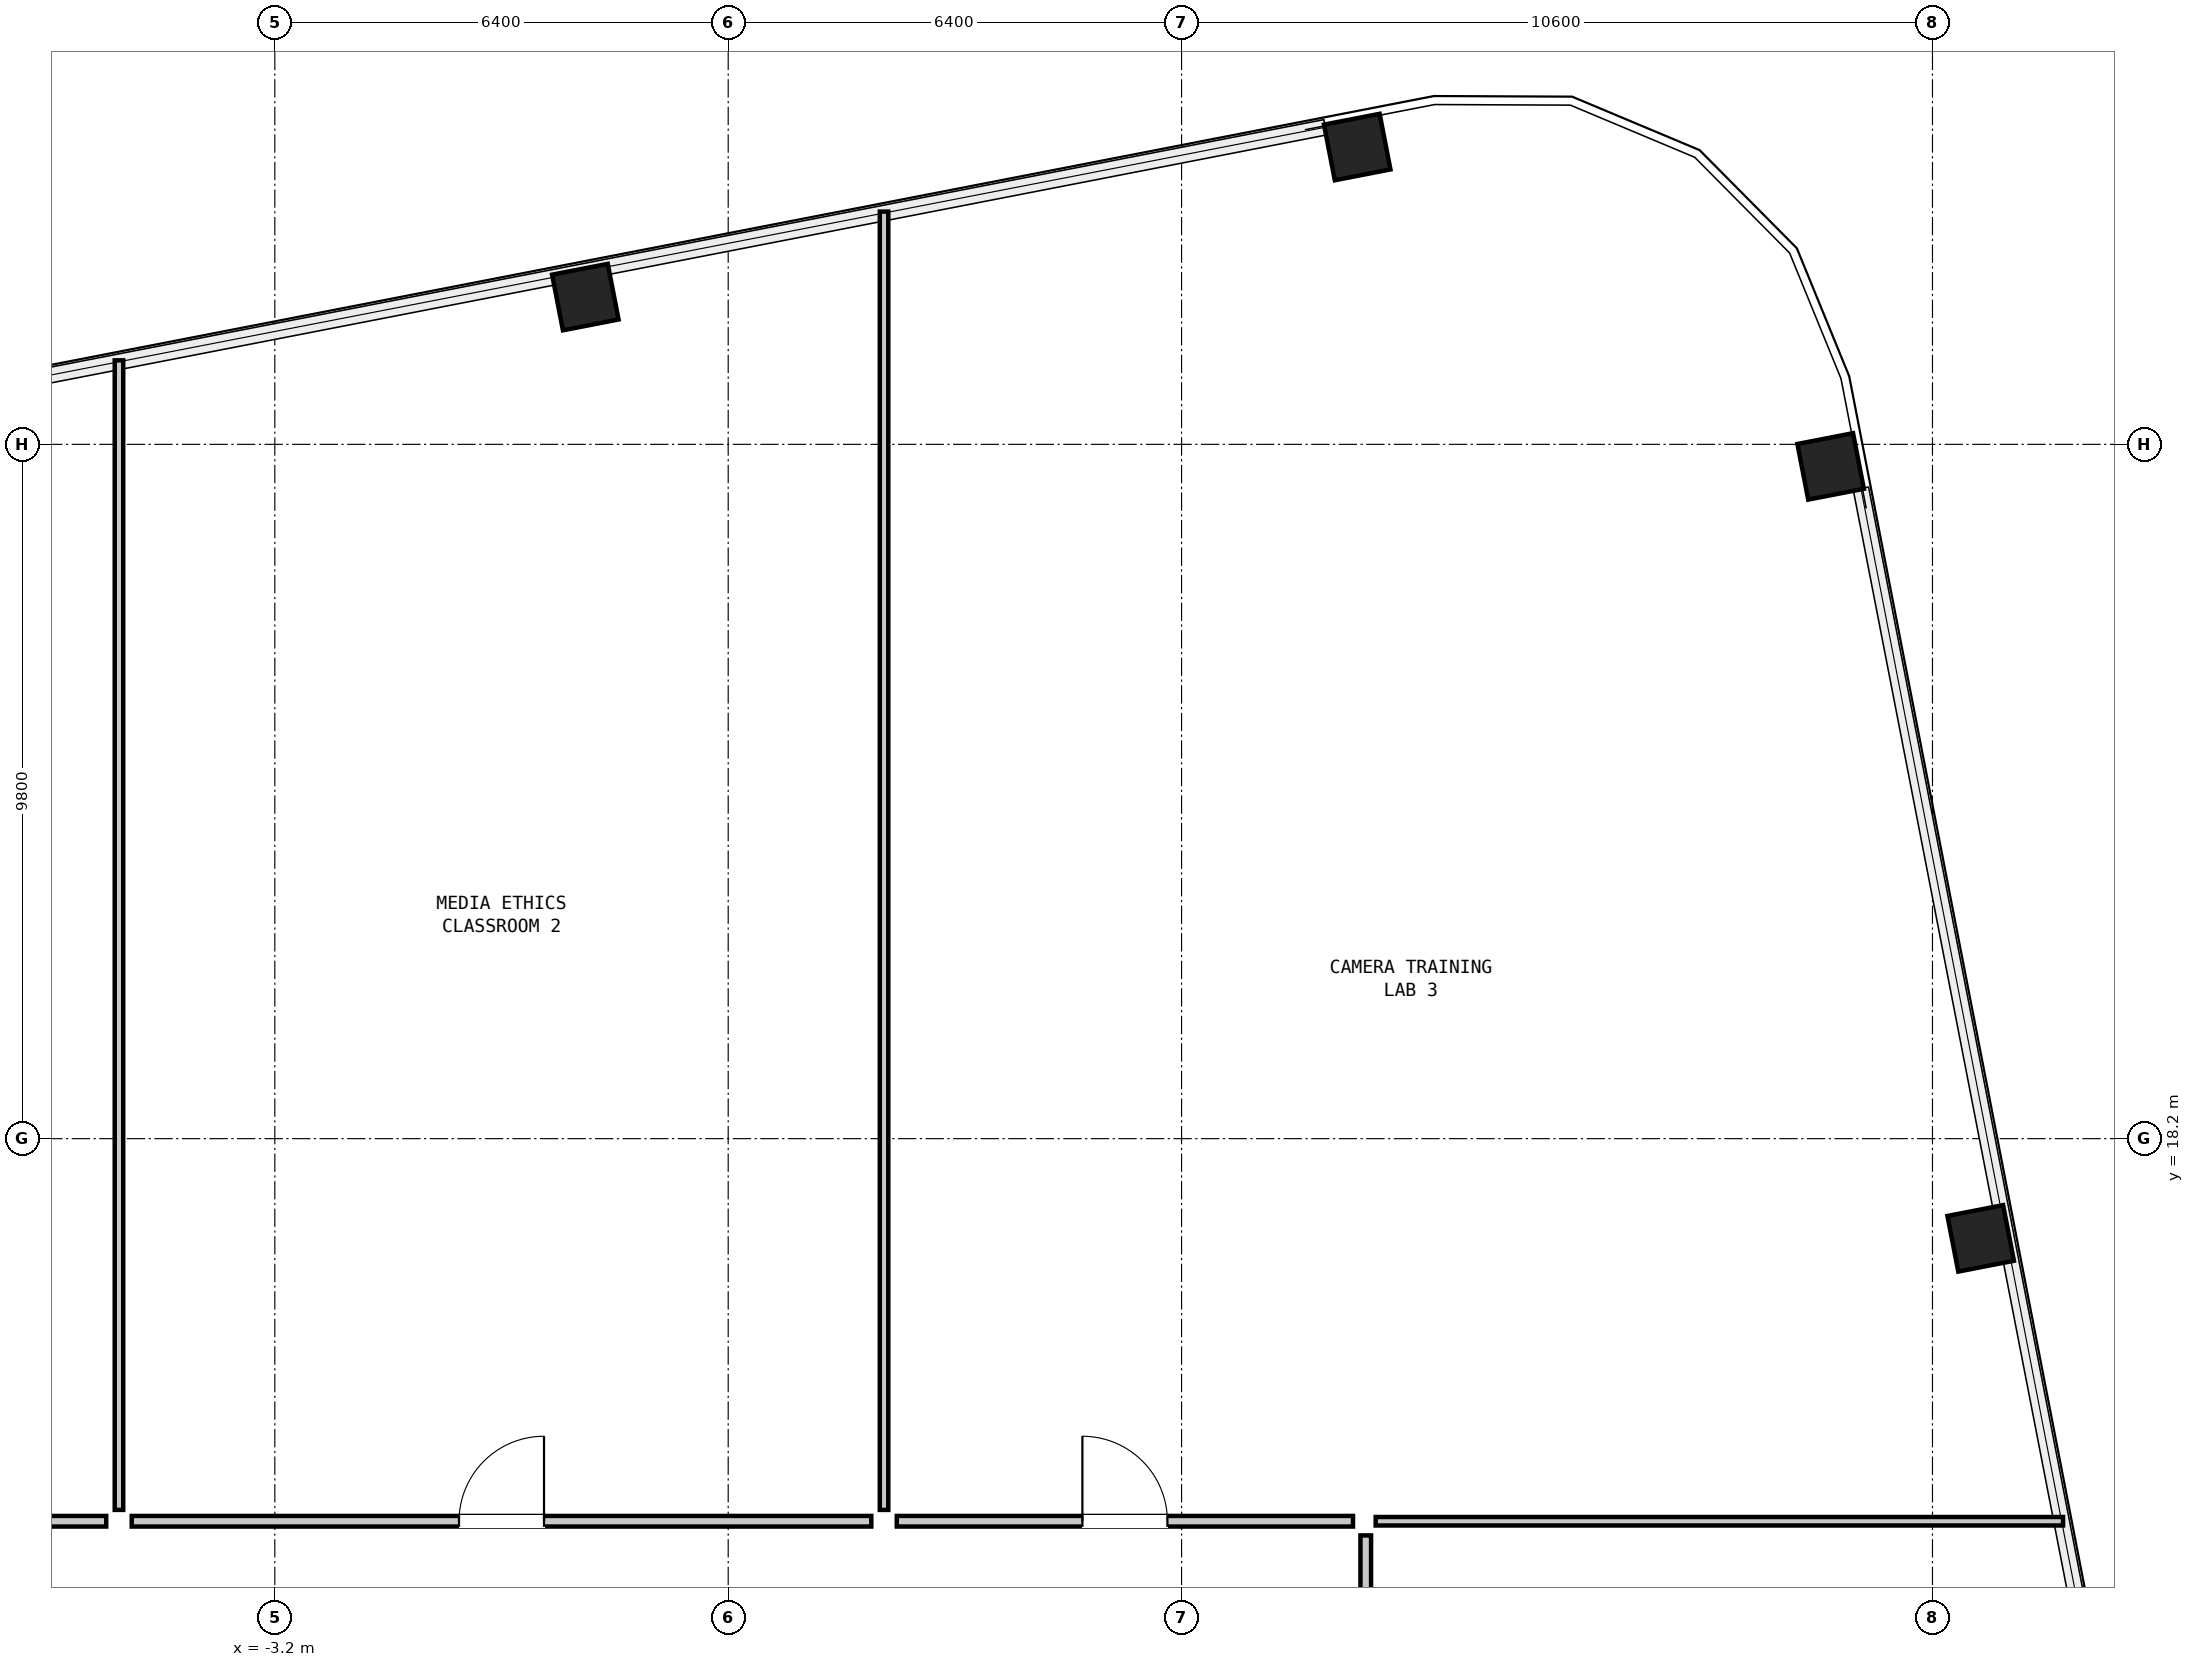
"""IFC4 building model, lengths in metres.
Left out: names, types, materials, properties, quantities, classifications, styles, units other than length and angle.
Written with IfcOpenShell. Run it as: python <this file> out.ifc"""

import sys

from ifc_helpers import new_model, si_unit, direction, frame, frame_2d, origin, origin_2d, place, context, subcontext, project, spatial, rectangle, hollow_rectangle, extrude, element, fill, save


model = new_model("IFC4")
c1 = context("Model", 3, precision=1e-05, world=origin(), true_north=direction((0.0, 1.0)))
c2 = subcontext(c1, "Body", "Model", "MODEL_VIEW")
j1 = project(units=[si_unit("LENGTHUNIT", "METRE"), si_unit("PLANEANGLEUNIT", "RADIAN")], contexts=[c1])
p1 = place(None, origin())
s1 = spatial("IfcSite", under=j1, at=p1, CompositionType="ELEMENT")
p2 = place(p1, origin())
s2 = spatial("IfcBuilding", under=s1, at=p2, CompositionType="ELEMENT")
p3 = place(p2, frame((0.0, 0.0, 140.25)))
s3 = spatial("IfcBuildingStorey", under=s2, at=p3, CompositionType="ELEMENT", Elevation=140.25)
for number, where, z_axis, x_axis in (
    (1, (20.88, 16.792, 0.0), (0.0, 0.0, 1.0), (-0.191, 0.982, 0.0)),
    (2, (18.762, 27.689, 0.0), (0.0, 0.0, 1.0), (-0.191, 0.982, 0.0)),
    (3, (12.08, 32.196, 0.0), (0.0, 0.0, 1.0), (0.982, 0.191, 0.0)),
    (4, (1.183, 30.078, 0.0), (0.0, 0.0, 1.0), (0.982, 0.191, 0.0)),
):
    element("IfcColumn", number, at=place(p3, frame(where, z_axis=z_axis, x_axis=x_axis)), inside=s3, PredefinedType="COLUMN", context=c2, shape_type="SweptSolid", body=[
        extrude(hollow_rectangle(XDim=0.8, YDim=0.8, WallThickness=0.05, at=origin_2d()), origin(), (0.0, 0.0, 1.0), 4.35),
    ])
p4 = place(p3, frame((12.34, 12.8, 0.0), z_axis=(0.0, 0.0, 1.0), x_axis=(1.0, 0.0, 0.0)))
e5 = element("IfcWall", 5, at=p4, inside=s3, PredefinedType="PARTITIONING", context=c2, shape_type="SweptSolid", body=[
    extrude(rectangle(XDim=9.703, YDim=0.12, at=frame_2d((4.852, 0.0))), origin(), (0.0, 0.0, 1.0), 4.07),
])
p5 = place(p3, frame((-5.4, 12.96, 0.0), z_axis=(0.0, 0.0, 1.0), x_axis=(0.0, 1.0, 0.0)))
e6 = element("IfcWall", 6, at=p5, inside=s3, PredefinedType="PARTITIONING", context=c2, shape_type="SweptSolid", body=[
    extrude(rectangle(XDim=16.226, YDim=0.12, at=frame_2d((8.113, 0.0))), origin(), (0.0, 0.0, 1.0), 2.25),
])
p6 = place(p3, frame((5.4, 12.96, 0.0), z_axis=(0.0, 0.0, 1.0), x_axis=(0.0, 1.0, 0.0)))
e7 = element("IfcWall", 7, at=p6, inside=s3, PredefinedType="PARTITIONING", context=c2, shape_type="SweptSolid", body=[
    extrude(rectangle(XDim=18.325, YDim=0.12, at=frame_2d((9.163, 0.0))), origin(), (0.0, 0.0, 1.0), 4.07),
])
p7 = place(p3, frame((-12.02, 12.8, 0.0), z_axis=(0.0, 0.0, 1.0), x_axis=(1.0, 0.0, 0.0)))
e8 = element("IfcWall", 8, at=p7, inside=s3, PredefinedType="PARTITIONING", context=c2, shape_type="SweptSolid", body=[
    extrude(rectangle(XDim=6.44, YDim=0.15, at=frame_2d((3.22, 0.0))), origin(), (0.0, 0.0, 1.0), 4.07),
])
p8 = place(p7, frame((2.62, 0.0, 0.0)))
e9 = element("IfcOpeningElement", 9, at=p8, cuts=e8, PredefinedType="OPENING", context=c2, shape_type="SweptSolid", body=[
    extrude(rectangle(XDim=1.2, YDim=2.1, at=frame_2d((0.6, 1.05))), frame((0.0, 0.087, 0.0), z_axis=(0.0, -1.0, 0.0), x_axis=(1.0, 0.0, 0.0)), (0.0, 0.0, 1.0), 0.174),
])
p9 = place(p3, frame((-5.22, 12.8, 0.0), z_axis=(0.0, 0.0, 1.0), x_axis=(1.0, 0.0, 0.0)))
e10 = element("IfcWall", 10, at=p9, inside=s3, PredefinedType="PARTITIONING", context=c2, shape_type="SweptSolid", body=[
    extrude(rectangle(XDim=10.44, YDim=0.15, at=frame_2d((5.22, 0.0))), origin(), (0.0, 0.0, 1.0), 4.07),
])
p10 = place(p9, frame((4.62, 0.0, 0.0)))
e11 = element("IfcOpeningElement", 11, at=p10, cuts=e10, PredefinedType="OPENING", context=c2, shape_type="SweptSolid", body=[
    extrude(rectangle(XDim=1.2, YDim=2.1, at=frame_2d((0.6, 1.05))), frame((0.0, 0.087, 0.0), z_axis=(0.0, -1.0, 0.0), x_axis=(1.0, 0.0, 0.0)), (0.0, 0.0, 1.0), 0.174),
])
p11 = place(p3, frame((5.58, 12.8, 0.0), z_axis=(0.0, 0.0, 1.0), x_axis=(1.0, 0.0, 0.0)))
e12 = element("IfcWall", 12, at=p11, inside=s3, PredefinedType="PARTITIONING", context=c2, shape_type="SweptSolid", body=[
    extrude(rectangle(XDim=6.44, YDim=0.15, at=frame_2d((3.22, 0.0))), origin(), (0.0, 0.0, 1.0), 4.07),
])
p12 = place(p11, frame((2.62, 0.0, 0.0)))
e13 = element("IfcOpeningElement", 13, at=p12, cuts=e12, PredefinedType="OPENING", context=c2, shape_type="SweptSolid", body=[
    extrude(rectangle(XDim=1.2, YDim=2.1, at=frame_2d((0.6, 1.05))), frame((0.0, 0.087, 0.0), z_axis=(0.0, -1.0, 0.0), x_axis=(1.0, 0.0, 0.0)), (0.0, 0.0, 1.0), 0.174),
])
p13 = place(p3, frame((12.2, 3.8, 0.0), z_axis=(0.0, 0.0, 1.0), x_axis=(0.0, 1.0, 0.0)))
e14 = element("IfcWall", 14, at=p13, inside=s3, PredefinedType="PARTITIONING", context=c2, shape_type="SweptSolid", body=[
    extrude(rectangle(XDim=8.8, YDim=0.15, at=frame_2d((4.4, 0.0))), origin(), (0.0, 0.0, 1.0), 4.07),
])
p14 = place(p13, frame((3.925, 0.0, 0.0)))
e15 = element("IfcOpeningElement", 15, at=p14, cuts=e14, PredefinedType="OPENING", context=c2, shape_type="SweptSolid", body=[
    extrude(rectangle(XDim=0.95, YDim=2.1, at=frame_2d((0.475, 1.05))), frame((0.0, 0.087, 0.0), z_axis=(0.0, -1.0, 0.0), x_axis=(1.0, 0.0, 0.0)), (0.0, 0.0, 1.0), 0.174),
])
p15 = place(p10, origin())
e16 = element("IfcDoor", 16, at=p15, inside=s3, OperationType="SINGLE_SWING_RIGHT", PredefinedType="DOOR", context=c2, shape_type="SweptSolid", body=[
    extrude(rectangle(XDim=1.2, YDim=2.1, at=frame_2d((0.6, 1.05))), frame((0.0, 0.025, 0.0), z_axis=(0.0, -1.0, 0.0), x_axis=(1.0, 0.0, 0.0)), (0.0, 0.0, 1.0), 0.05),
])
fill(e11, e16)
p16 = place(p12, origin())
e17 = element("IfcDoor", 17, at=p16, inside=s3, OperationType="SINGLE_SWING_LEFT", PredefinedType="DOOR", context=c2, shape_type="SweptSolid", body=[
    extrude(rectangle(XDim=1.2, YDim=2.1, at=frame_2d((0.6, 1.05))), frame((0.0, 0.025, 0.0), z_axis=(0.0, -1.0, 0.0), x_axis=(1.0, 0.0, 0.0)), (0.0, 0.0, 1.0), 0.05),
])
fill(e13, e17)
save(model, sys.argv[1])
